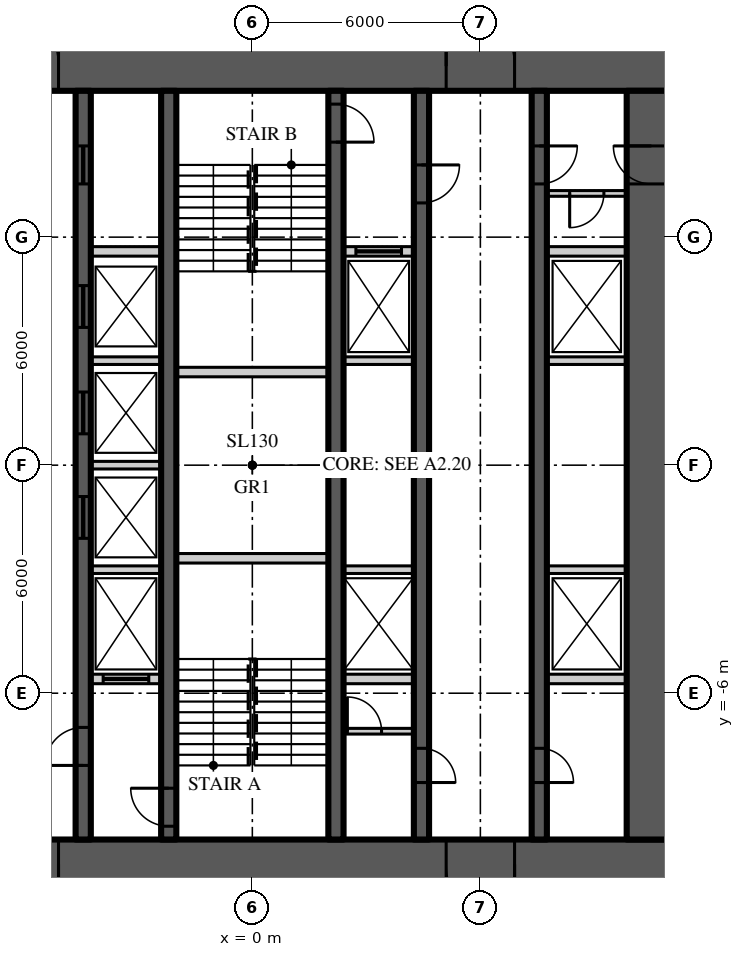
"""IFC4 building model, lengths in metres.
Left out: names, types, materials, properties, quantities, classifications, styles, units other than length and angle.
Written with IfcOpenShell. Run it as: python <this file> out.ifc"""

import sys

from ifc_helpers import new_model, si_unit, direction, frame, frame_2d, origin, place, context, subcontext, project, spatial, rectangle, extrude, element, fill, save


model = new_model("IFC4")
c1 = context("Model", 3, precision=1e-05, world=origin(), true_north=direction((0.0, 1.0)))
c2 = subcontext(c1, "Body", "Model", "MODEL_VIEW")
j1 = project(units=[si_unit("LENGTHUNIT", "METRE"), si_unit("PLANEANGLEUNIT", "RADIAN")], contexts=[c1])
p1 = place(None, origin())
s1 = spatial("IfcSite", under=j1, at=p1, CompositionType="ELEMENT")
p2 = place(p1, origin())
s2 = spatial("IfcBuilding", under=s1, at=p2, CompositionType="ELEMENT")
p3 = place(p2, frame((0.0, 0.0, 143.7)))
s3 = spatial("IfcBuildingStorey", under=s2, at=p3, CompositionType="ELEMENT", Elevation=143.7)
p4 = place(p3, frame((-11.15, 10.5, 0.0), z_axis=(0.0, 0.0, 1.0), x_axis=(1.0, 0.0, 0.0)))
e1 = element("IfcWall", 1, at=p4, inside=s3, PredefinedType="SHEAR", context=c2, shape_type="SweptSolid", body=[
    extrude(rectangle(XDim=22.3, YDim=1.3, at=frame_2d((11.15, 0.0))), origin(), (0.0, 0.0, 1.0), 3.9),
])
p5 = place(p4, frame((4.25, 0.0, 0.0)))
e2 = element("IfcOpeningElement", 2, at=p5, cuts=e1, PredefinedType="OPENING", context=c2, shape_type="SweptSolid", body=[
    extrude(rectangle(XDim=1.8, YDim=2.2, at=frame_2d((0.9, 1.1))), frame((0.0, 0.66, 0.0), z_axis=(0.0, -1.0, 0.0), x_axis=(1.0, 0.0, 0.0)), (0.0, 0.0, 1.0), 1.32),
])
p6 = place(p4, frame((16.25, 0.0, 0.0)))
e3 = element("IfcOpeningElement", 3, at=p6, cuts=e1, PredefinedType="OPENING", context=c2, shape_type="SweptSolid", body=[
    extrude(rectangle(XDim=1.8, YDim=2.2, at=frame_2d((0.9, 1.1))), frame((0.0, 0.66, 0.0), z_axis=(0.0, -1.0, 0.0), x_axis=(1.0, 0.0, 0.0)), (0.0, 0.0, 1.0), 1.32),
])
p7 = place(p3, frame((11.15, -10.5, 0.0), z_axis=(0.0, 0.0, 1.0), x_axis=(-1.0, 0.0, 0.0)))
e4 = element("IfcWall", 4, at=p7, inside=s3, PredefinedType="SHEAR", context=c2, shape_type="SweptSolid", body=[
    extrude(rectangle(XDim=22.3, YDim=1.3, at=frame_2d((11.15, 0.0))), origin(), (0.0, 0.0, 1.0), 3.9),
])
p8 = place(p7, frame((16.25, 0.0, 0.0)))
e5 = element("IfcOpeningElement", 5, at=p8, cuts=e4, PredefinedType="OPENING", context=c2, shape_type="SweptSolid", body=[
    extrude(rectangle(XDim=1.8, YDim=2.2, at=frame_2d((0.9, 1.1))), frame((0.0, 0.66, 0.0), z_axis=(0.0, -1.0, 0.0), x_axis=(1.0, 0.0, 0.0)), (0.0, 0.0, 1.0), 1.32),
])
p9 = place(p7, frame((4.25, 0.0, 0.0)))
e6 = element("IfcOpeningElement", 6, at=p9, cuts=e4, PredefinedType="OPENING", context=c2, shape_type="SweptSolid", body=[
    extrude(rectangle(XDim=1.8, YDim=2.2, at=frame_2d((0.9, 1.1))), frame((0.0, 0.66, 0.0), z_axis=(0.0, -1.0, 0.0), x_axis=(1.0, 0.0, 0.0)), (0.0, 0.0, 1.0), 1.32),
])
p10 = place(p3, frame((10.5, -9.85, 0.0), z_axis=(0.0, 0.0, 1.0), x_axis=(0.0, 1.0, 0.0)))
e7 = element("IfcWall", 7, at=p10, inside=s3, PredefinedType="SHEAR", context=c2, shape_type="SweptSolid", body=[
    extrude(rectangle(XDim=19.7, YDim=1.3, at=frame_2d((9.85, 0.0))), origin(), (0.0, 0.0, 1.0), 3.9),
])
p11 = place(p10, frame((17.25, 0.0, 0.0)))
e8 = element("IfcOpeningElement", 8, at=p11, cuts=e7, PredefinedType="OPENING", context=c2, shape_type="SweptSolid", body=[
    extrude(rectangle(XDim=1.0, YDim=2.2, at=frame_2d((0.5, 1.1))), frame((0.0, 0.66, 0.0), z_axis=(0.0, -1.0, 0.0), x_axis=(1.0, 0.0, 0.0)), (0.0, 0.0, 1.0), 1.32),
])
p12 = place(p3, frame((7.55, 9.85, 0.0), z_axis=(0.0, 0.0, 1.0), x_axis=(0.0, -1.0, 0.0)))
e9 = element("IfcWall", 9, at=p12, inside=s3, PredefinedType="SHEAR", context=c2, shape_type="SweptSolid", body=[
    extrude(rectangle(XDim=19.7, YDim=0.4, at=frame_2d((9.85, 0.0))), origin(), (0.0, 0.0, 1.0), 3.9),
])
p13 = place(p12, frame((1.45, 0.0, 0.0)))
e10 = element("IfcOpeningElement", 10, at=p13, cuts=e9, PredefinedType="OPENING", context=c2, shape_type="SweptSolid", body=[
    extrude(rectangle(XDim=1.0, YDim=2.2, at=frame_2d((0.5, 1.1))), frame((0.0, 0.21, 0.0), z_axis=(0.0, -1.0, 0.0), x_axis=(1.0, 0.0, 0.0)), (0.0, 0.0, 1.0), 0.42),
])
p14 = place(p12, frame((17.3, 0.0, 0.0)))
e11 = element("IfcOpeningElement", 11, at=p14, cuts=e9, PredefinedType="OPENING", context=c2, shape_type="SweptSolid", body=[
    extrude(rectangle(XDim=0.9, YDim=2.1, at=frame_2d((0.45, 1.05))), frame((0.0, 0.21, 0.0), z_axis=(0.0, -1.0, 0.0), x_axis=(1.0, 0.0, 0.0)), (0.0, 0.0, 1.0), 0.42),
])
p15 = place(p3, frame((-4.45, -9.85, 0.0), z_axis=(0.0, 0.0, 1.0), x_axis=(0.0, 1.0, 0.0)))
e12 = element("IfcWall", 12, at=p15, inside=s3, PredefinedType="SHEAR", context=c2, shape_type="SweptSolid", body=[
    extrude(rectangle(XDim=19.7, YDim=0.4, at=frame_2d((9.85, 0.0))), origin(), (0.0, 0.0, 1.0), 3.9),
])
p16 = place(p15, frame((1.95, 0.0, 0.0)))
e13 = element("IfcOpeningElement", 13, at=p16, cuts=e12, PredefinedType="OPENING", context=c2, shape_type="SweptSolid", body=[
    extrude(rectangle(XDim=1.0, YDim=2.2, at=frame_2d((0.5, 1.1))), frame((0.0, 0.21, 0.0), z_axis=(0.0, -1.0, 0.0), x_axis=(1.0, 0.0, 0.0)), (0.0, 0.0, 1.0), 0.42),
])
p17 = place(p15, frame((17.25, 0.0, 0.0)))
e14 = element("IfcOpeningElement", 14, at=p17, cuts=e12, PredefinedType="OPENING", context=c2, shape_type="SweptSolid", body=[
    extrude(rectangle(XDim=1.0, YDim=2.1, at=frame_2d((0.5, 1.05))), frame((0.0, 0.21, 0.0), z_axis=(0.0, -1.0, 0.0), x_axis=(1.0, 0.0, 0.0)), (0.0, 0.0, 1.0), 0.42),
])
p18 = place(p15, frame((7.925, 0.0, 0.0)))
e15 = element("IfcOpeningElement", 15, at=p18, cuts=e12, PredefinedType="OPENING", context=c2, shape_type="SweptSolid", body=[
    extrude(rectangle(XDim=1.1, YDim=2.2, at=frame_2d((0.55, 1.1))), frame((0.0, 0.21, 0.0), z_axis=(0.0, -1.0, 0.0), x_axis=(1.0, 0.0, 0.0)), (0.0, 0.0, 1.0), 0.42),
])
p19 = place(p15, frame((10.675, 0.0, 0.0)))
e16 = element("IfcOpeningElement", 16, at=p19, cuts=e12, PredefinedType="OPENING", context=c2, shape_type="SweptSolid", body=[
    extrude(rectangle(XDim=1.1, YDim=2.2, at=frame_2d((0.55, 1.1))), frame((0.0, 0.21, 0.0), z_axis=(0.0, -1.0, 0.0), x_axis=(1.0, 0.0, 0.0)), (0.0, 0.0, 1.0), 0.42),
])
p20 = place(p15, frame((13.475, 0.0, 0.0)))
e17 = element("IfcOpeningElement", 17, at=p20, cuts=e12, PredefinedType="OPENING", context=c2, shape_type="SweptSolid", body=[
    extrude(rectangle(XDim=1.1, YDim=2.2, at=frame_2d((0.55, 1.1))), frame((0.0, 0.21, 0.0), z_axis=(0.0, -1.0, 0.0), x_axis=(1.0, 0.0, 0.0)), (0.0, 0.0, 1.0), 0.42),
])
p21 = place(p3, frame((4.45, 9.85, 0.0), z_axis=(0.0, 0.0, 1.0), x_axis=(0.0, -1.0, 0.0)))
e18 = element("IfcWall", 18, at=p21, inside=s3, PredefinedType="SHEAR", context=c2, shape_type="SweptSolid", body=[
    extrude(rectangle(XDim=19.7, YDim=0.4, at=frame_2d((9.85, 0.0))), origin(), (0.0, 0.0, 1.0), 3.9),
])
p22 = place(p21, frame((1.95, 0.0, 0.0)))
e19 = element("IfcOpeningElement", 19, at=p22, cuts=e18, PredefinedType="OPENING", context=c2, shape_type="SweptSolid", body=[
    extrude(rectangle(XDim=1.0, YDim=2.2, at=frame_2d((0.5, 1.1))), frame((0.0, 0.21, 0.0), z_axis=(0.0, -1.0, 0.0), x_axis=(1.0, 0.0, 0.0)), (0.0, 0.0, 1.0), 0.42),
])
p23 = place(p21, frame((17.3, 0.0, 0.0)))
e20 = element("IfcOpeningElement", 20, at=p23, cuts=e18, PredefinedType="OPENING", context=c2, shape_type="SweptSolid", body=[
    extrude(rectangle(XDim=0.9, YDim=2.1, at=frame_2d((0.45, 1.05))), frame((0.0, 0.21, 0.0), z_axis=(0.0, -1.0, 0.0), x_axis=(1.0, 0.0, 0.0)), (0.0, 0.0, 1.0), 0.42),
])
p24 = place(p3, frame((-2.2, -9.85, 0.0), z_axis=(0.0, 0.0, 1.0), x_axis=(0.0, 1.0, 0.0)))
e21 = element("IfcWall", 21, at=p24, inside=s3, PredefinedType="SHEAR", context=c2, shape_type="SweptSolid", body=[
    extrude(rectangle(XDim=19.7, YDim=0.4, at=frame_2d((9.85, 0.0))), origin(), (0.0, 0.0, 1.0), 3.9),
])
p25 = place(p24, frame((0.35, 0.0, 0.0)))
e22 = element("IfcOpeningElement", 22, at=p25, cuts=e21, PredefinedType="OPENING", context=c2, shape_type="SweptSolid", body=[
    extrude(rectangle(XDim=1.0, YDim=2.2, at=frame_2d((0.5, 1.1))), frame((0.0, 0.21, 0.0), z_axis=(0.0, -1.0, 0.0), x_axis=(1.0, 0.0, 0.0)), (0.0, 0.0, 1.0), 0.42),
])
p26 = place(p3, frame((2.2, 9.85, 0.0), z_axis=(0.0, 0.0, 1.0), x_axis=(0.0, -1.0, 0.0)))
e23 = element("IfcWall", 23, at=p26, inside=s3, PredefinedType="SHEAR", context=c2, shape_type="SweptSolid", body=[
    extrude(rectangle(XDim=19.7, YDim=0.4, at=frame_2d((9.85, 0.0))), origin(), (0.0, 0.0, 1.0), 3.9),
])
p27 = place(p26, frame((0.35, 0.0, 0.0)))
e24 = element("IfcOpeningElement", 24, at=p27, cuts=e23, PredefinedType="OPENING", context=c2, shape_type="SweptSolid", body=[
    extrude(rectangle(XDim=1.0, YDim=2.2, at=frame_2d((0.5, 1.1))), frame((0.0, 0.21, 0.0), z_axis=(0.0, -1.0, 0.0), x_axis=(1.0, 0.0, 0.0)), (0.0, 0.0, 1.0), 0.42),
])
p28 = place(p3, frame((-4.25, 5.625, 0.0), z_axis=(0.0, 0.0, 1.0), x_axis=(1.0, 0.0, 0.0)))
e25 = element("IfcWall", 25, at=p28, inside=s3, PredefinedType="SOLIDWALL", context=c2, shape_type="SweptSolid", body=[
    extrude(rectangle(XDim=1.85, YDim=0.25, at=frame_2d((0.925, 0.0))), origin(), (0.0, 0.0, 1.0), 3.7),
])
p29 = place(p3, frame((2.4, 5.625, 0.0), z_axis=(0.0, 0.0, 1.0), x_axis=(1.0, 0.0, 0.0)))
e26 = element("IfcWall", 26, at=p29, inside=s3, PredefinedType="SOLIDWALL", context=c2, shape_type="SweptSolid", body=[
    extrude(rectangle(XDim=1.85, YDim=0.25, at=frame_2d((0.925, 0.0))), origin(), (0.0, 0.0, 1.0), 3.7),
])
p30 = place(p29, frame((0.325, 0.0, 0.0)))
e27 = element("IfcOpeningElement", 27, at=p30, cuts=e26, PredefinedType="OPENING", context=c2, shape_type="SweptSolid", body=[
    extrude(rectangle(XDim=1.2, YDim=2.2, at=frame_2d((0.6, 1.1))), frame((0.0, 0.135, 0.0), z_axis=(0.0, -1.0, 0.0), x_axis=(1.0, 0.0, 0.0)), (0.0, 0.0, 1.0), 0.27),
])
p31 = place(p3, frame((7.75, 5.625, 0.0), z_axis=(0.0, 0.0, 1.0), x_axis=(1.0, 0.0, 0.0)))
e28 = element("IfcWall", 28, at=p31, inside=s3, PredefinedType="SOLIDWALL", context=c2, shape_type="SweptSolid", body=[
    extrude(rectangle(XDim=2.1, YDim=0.25, at=frame_2d((1.05, 0.0))), origin(), (0.0, 0.0, 1.0), 3.7),
])
p32 = place(p3, frame((-4.25, -5.625, 0.0), z_axis=(0.0, 0.0, 1.0), x_axis=(1.0, 0.0, 0.0)))
e29 = element("IfcWall", 29, at=p32, inside=s3, PredefinedType="SOLIDWALL", context=c2, shape_type="SweptSolid", body=[
    extrude(rectangle(XDim=1.85, YDim=0.25, at=frame_2d((0.925, 0.0))), origin(), (0.0, 0.0, 1.0), 3.7),
])
p33 = place(p32, frame((0.325, 0.0, 0.0)))
e30 = element("IfcOpeningElement", 30, at=p33, cuts=e29, PredefinedType="OPENING", context=c2, shape_type="SweptSolid", body=[
    extrude(rectangle(XDim=1.2, YDim=2.2, at=frame_2d((0.6, 1.1))), frame((0.0, 0.135, 0.0), z_axis=(0.0, -1.0, 0.0), x_axis=(1.0, 0.0, 0.0)), (0.0, 0.0, 1.0), 0.27),
])
p34 = place(p3, frame((2.4, -5.625, 0.0), z_axis=(0.0, 0.0, 1.0), x_axis=(1.0, 0.0, 0.0)))
e31 = element("IfcWall", 31, at=p34, inside=s3, PredefinedType="SOLIDWALL", context=c2, shape_type="SweptSolid", body=[
    extrude(rectangle(XDim=1.85, YDim=0.25, at=frame_2d((0.925, 0.0))), origin(), (0.0, 0.0, 1.0), 3.7),
])
p35 = place(p3, frame((7.75, -5.625, 0.0), z_axis=(0.0, 0.0, 1.0), x_axis=(1.0, 0.0, 0.0)))
e32 = element("IfcWall", 32, at=p35, inside=s3, PredefinedType="SOLIDWALL", context=c2, shape_type="SweptSolid", body=[
    extrude(rectangle(XDim=2.1, YDim=0.25, at=frame_2d((1.05, 0.0))), origin(), (0.0, 0.0, 1.0), 3.7),
])
for number, where, z_axis, x_axis in (
    (33, (-2.0, -2.45, 0.0), (0.0, 0.0, 1.0), (1.0, 0.0, 0.0)),
    (34, (-2.0, 2.45, 0.0), (0.0, 0.0, 1.0), (1.0, 0.0, 0.0)),
):
    element("IfcWall", number, at=place(p3, frame(where, z_axis=z_axis, x_axis=x_axis)), inside=s3, PredefinedType="SOLIDWALL", context=c2, shape_type="SweptSolid", body=[
        extrude(rectangle(XDim=4.0, YDim=0.25, at=frame_2d((2.0, 0.0))), origin(), (0.0, 0.0, 1.0), 3.7),
    ])
for number, where, z_axis, x_axis in (
    (35, (-4.25, -2.75, 0.0), (0.0, 0.0, 1.0), (1.0, 0.0, 0.0)),
    (36, (2.4, -2.75, 0.0), (0.0, 0.0, 1.0), (1.0, 0.0, 0.0)),
):
    element("IfcWall", number, at=place(p3, frame(where, z_axis=z_axis, x_axis=x_axis)), inside=s3, PredefinedType="SOLIDWALL", context=c2, shape_type="SweptSolid", body=[
        extrude(rectangle(XDim=1.85, YDim=0.2, at=frame_2d((0.925, 0.0))), origin(), (0.0, 0.0, 1.0), 3.7),
    ])
p36 = place(p3, frame((7.75, -2.75, 0.0), z_axis=(0.0, 0.0, 1.0), x_axis=(1.0, 0.0, 0.0)))
e37 = element("IfcWall", 37, at=p36, inside=s3, PredefinedType="SOLIDWALL", context=c2, shape_type="SweptSolid", body=[
    extrude(rectangle(XDim=2.1, YDim=0.2, at=frame_2d((1.05, 0.0))), origin(), (0.0, 0.0, 1.0), 3.7),
])
for number, where, z_axis, x_axis in (
    (38, (-4.25, 0.0, 0.0), (0.0, 0.0, 1.0), (1.0, 0.0, 0.0)),
    (39, (-4.25, 2.75, 0.0), (0.0, 0.0, 1.0), (1.0, 0.0, 0.0)),
    (40, (2.4, 2.75, 0.0), (0.0, 0.0, 1.0), (1.0, 0.0, 0.0)),
):
    element("IfcWall", number, at=place(p3, frame(where, z_axis=z_axis, x_axis=x_axis)), inside=s3, PredefinedType="SOLIDWALL", context=c2, shape_type="SweptSolid", body=[
        extrude(rectangle(XDim=1.85, YDim=0.2, at=frame_2d((0.925, 0.0))), origin(), (0.0, 0.0, 1.0), 3.7),
    ])
p37 = place(p3, frame((7.75, 2.75, 0.0), z_axis=(0.0, 0.0, 1.0), x_axis=(1.0, 0.0, 0.0)))
e41 = element("IfcWall", 41, at=p37, inside=s3, PredefinedType="SOLIDWALL", context=c2, shape_type="SweptSolid", body=[
    extrude(rectangle(XDim=2.1, YDim=0.2, at=frame_2d((1.05, 0.0))), origin(), (0.0, 0.0, 1.0), 3.7),
])
p38 = place(p3, frame((2.4, -7.0, 0.0), z_axis=(0.0, 0.0, 1.0), x_axis=(1.0, 0.0, 0.0)))
e42 = element("IfcWall", 42, at=p38, inside=s3, PredefinedType="SOLIDWALL", context=c2, shape_type="SweptSolid", body=[
    extrude(rectangle(XDim=1.85, YDim=0.15, at=frame_2d((0.925, 0.0))), origin(), (0.0, 0.0, 1.0), 3.77),
])
p39 = place(p38, frame((0.1, 0.0, 0.0)))
e43 = element("IfcOpeningElement", 43, at=p39, cuts=e42, PredefinedType="OPENING", context=c2, shape_type="SweptSolid", body=[
    extrude(rectangle(XDim=0.9, YDim=2.1, at=frame_2d((0.45, 1.05))), frame((0.0, 0.085, 0.0), z_axis=(0.0, -1.0, 0.0), x_axis=(1.0, 0.0, 0.0)), (0.0, 0.0, 1.0), 0.17),
])
p40 = place(p3, frame((9.85, 7.15, 0.0), z_axis=(0.0, 0.0, 1.0), x_axis=(-1.0, 0.0, 0.0)))
e44 = element("IfcWall", 44, at=p40, inside=s3, PredefinedType="SOLIDWALL", context=c2, shape_type="SweptSolid", body=[
    extrude(rectangle(XDim=2.1, YDim=0.15, at=frame_2d((1.05, 0.0))), origin(), (0.0, 0.0, 1.0), 3.77),
])
p41 = place(p40, frame((0.6, 0.0, 0.0)))
e45 = element("IfcOpeningElement", 45, at=p41, cuts=e44, PredefinedType="OPENING", context=c2, shape_type="SweptSolid", body=[
    extrude(rectangle(XDim=0.9, YDim=2.1, at=frame_2d((0.45, 1.05))), frame((0.0, 0.085, 0.0), z_axis=(0.0, -1.0, 0.0), x_axis=(1.0, 0.0, 0.0)), (0.0, 0.0, 1.0), 0.17),
])
p42 = place(p5, origin())
e46 = element("IfcDoor", 46, at=p42, inside=s3, OperationType="DOUBLE_DOOR_DOUBLE_SWING", PredefinedType="DOOR", context=c2, shape_type="SweptSolid", body=[
    extrude(rectangle(XDim=1.8, YDim=2.2, at=frame_2d((0.9, 1.1))), frame((0.0, 0.025, 0.0), z_axis=(0.0, -1.0, 0.0), x_axis=(1.0, 0.0, 0.0)), (0.0, 0.0, 1.0), 0.05),
])
fill(e2, e46)
p43 = place(p8, origin())
e47 = element("IfcDoor", 47, at=p43, inside=s3, OperationType="DOUBLE_DOOR_DOUBLE_SWING", PredefinedType="DOOR", context=c2, shape_type="SweptSolid", body=[
    extrude(rectangle(XDim=1.8, YDim=2.2, at=frame_2d((0.9, 1.1))), frame((0.0, 0.025, 0.0), z_axis=(0.0, -1.0, 0.0), x_axis=(1.0, 0.0, 0.0)), (0.0, 0.0, 1.0), 0.05),
])
fill(e5, e47)
p44 = place(p6, origin())
e48 = element("IfcDoor", 48, at=p44, inside=s3, OperationType="DOUBLE_DOOR_DOUBLE_SWING", PredefinedType="DOOR", context=c2, shape_type="SweptSolid", body=[
    extrude(rectangle(XDim=1.8, YDim=2.2, at=frame_2d((0.9, 1.1))), frame((0.0, 0.025, 0.0), z_axis=(0.0, -1.0, 0.0), x_axis=(1.0, 0.0, 0.0)), (0.0, 0.0, 1.0), 0.05),
])
fill(e3, e48)
p45 = place(p9, origin())
e49 = element("IfcDoor", 49, at=p45, inside=s3, OperationType="DOUBLE_DOOR_DOUBLE_SWING", PredefinedType="DOOR", context=c2, shape_type="SweptSolid", body=[
    extrude(rectangle(XDim=1.8, YDim=2.2, at=frame_2d((0.9, 1.1))), frame((0.0, 0.025, 0.0), z_axis=(0.0, -1.0, 0.0), x_axis=(1.0, 0.0, 0.0)), (0.0, 0.0, 1.0), 0.05),
])
fill(e6, e49)
p46 = place(p13, origin())
e50 = element("IfcDoor", 50, at=p46, inside=s3, OperationType="SINGLE_SWING_LEFT", PredefinedType="DOOR", context=c2, shape_type="SweptSolid", body=[
    extrude(rectangle(XDim=1.0, YDim=2.2, at=frame_2d((0.5, 1.1))), frame((0.0, 0.025, 0.0), z_axis=(0.0, -1.0, 0.0), x_axis=(1.0, 0.0, 0.0)), (0.0, 0.0, 1.0), 0.05),
])
fill(e10, e50)
p47 = place(p11, origin())
e51 = element("IfcDoor", 51, at=p47, inside=s3, OperationType="SINGLE_SWING_RIGHT", PredefinedType="DOOR", context=c2, shape_type="SweptSolid", body=[
    extrude(rectangle(XDim=1.0, YDim=2.2, at=frame_2d((0.5, 1.1))), frame((0.0, 0.025, 0.0), z_axis=(0.0, -1.0, 0.0), x_axis=(1.0, 0.0, 0.0)), (0.0, 0.0, 1.0), 0.05),
])
fill(e8, e51)
p48 = place(p16, origin())
e52 = element("IfcDoor", 52, at=p48, inside=s3, OperationType="SINGLE_SWING_LEFT", PredefinedType="DOOR", context=c2, shape_type="SweptSolid", body=[
    extrude(rectangle(XDim=1.0, YDim=2.2, at=frame_2d((0.5, 1.1))), frame((0.0, 0.025, 0.0), z_axis=(0.0, -1.0, 0.0), x_axis=(1.0, 0.0, 0.0)), (0.0, 0.0, 1.0), 0.05),
])
fill(e13, e52)
p49 = place(p25, origin())
e53 = element("IfcDoor", 53, at=p49, inside=s3, OperationType="SINGLE_SWING_RIGHT", PredefinedType="DOOR", context=c2, shape_type="SweptSolid", body=[
    extrude(rectangle(XDim=1.0, YDim=2.2, at=frame_2d((0.5, 1.1))), frame((0.0, 0.025, 0.0), z_axis=(0.0, -1.0, 0.0), x_axis=(1.0, 0.0, 0.0)), (0.0, 0.0, 1.0), 0.05),
])
fill(e22, e53)
p50 = place(p22, origin())
e54 = element("IfcDoor", 54, at=p50, inside=s3, OperationType="SINGLE_SWING_LEFT", PredefinedType="DOOR", context=c2, shape_type="SweptSolid", body=[
    extrude(rectangle(XDim=1.0, YDim=2.2, at=frame_2d((0.5, 1.1))), frame((0.0, 0.025, 0.0), z_axis=(0.0, -1.0, 0.0), x_axis=(1.0, 0.0, 0.0)), (0.0, 0.0, 1.0), 0.05),
])
fill(e19, e54)
p51 = place(p27, origin())
e55 = element("IfcDoor", 55, at=p51, inside=s3, OperationType="SINGLE_SWING_RIGHT", PredefinedType="DOOR", context=c2, shape_type="SweptSolid", body=[
    extrude(rectangle(XDim=1.0, YDim=2.2, at=frame_2d((0.5, 1.1))), frame((0.0, 0.025, 0.0), z_axis=(0.0, -1.0, 0.0), x_axis=(1.0, 0.0, 0.0)), (0.0, 0.0, 1.0), 0.05),
])
fill(e24, e55)
p52 = place(p17, origin())
e56 = element("IfcDoor", 56, at=p52, inside=s3, OperationType="SLIDING_TO_LEFT", PredefinedType="DOOR", context=c2, shape_type="SweptSolid", body=[
    extrude(rectangle(XDim=1.0, YDim=2.1, at=frame_2d((0.5, 1.05))), frame((0.0, 0.025, 0.0), z_axis=(0.0, -1.0, 0.0), x_axis=(1.0, 0.0, 0.0)), (0.0, 0.0, 1.0), 0.05),
])
fill(e14, e56)
p53 = place(p14, origin())
e57 = element("IfcDoor", 57, at=p53, inside=s3, OperationType="SINGLE_SWING_RIGHT", PredefinedType="DOOR", context=c2, shape_type="SweptSolid", body=[
    extrude(rectangle(XDim=0.9, YDim=2.1, at=frame_2d((0.45, 1.05))), frame((0.0, 0.025, 0.0), z_axis=(0.0, -1.0, 0.0), x_axis=(1.0, 0.0, 0.0)), (0.0, 0.0, 1.0), 0.05),
])
fill(e11, e57)
p54 = place(p23, origin())
e58 = element("IfcDoor", 58, at=p54, inside=s3, OperationType="SINGLE_SWING_RIGHT", PredefinedType="DOOR", context=c2, shape_type="SweptSolid", body=[
    extrude(rectangle(XDim=0.9, YDim=2.1, at=frame_2d((0.45, 1.05))), frame((0.0, 0.025, 0.0), z_axis=(0.0, -1.0, 0.0), x_axis=(1.0, 0.0, 0.0)), (0.0, 0.0, 1.0), 0.05),
])
fill(e20, e58)
p55 = place(p18, origin())
e59 = element("IfcDoor", 59, at=p55, inside=s3, OperationType="SLIDING_TO_LEFT", PredefinedType="DOOR", context=c2, shape_type="SweptSolid", body=[
    extrude(rectangle(XDim=1.1, YDim=2.2, at=frame_2d((0.55, 1.1))), frame((0.0, 0.025, 0.0), z_axis=(0.0, -1.0, 0.0), x_axis=(1.0, 0.0, 0.0)), (0.0, 0.0, 1.0), 0.05),
])
fill(e15, e59)
p56 = place(p19, origin())
e60 = element("IfcDoor", 60, at=p56, inside=s3, OperationType="SLIDING_TO_LEFT", PredefinedType="DOOR", context=c2, shape_type="SweptSolid", body=[
    extrude(rectangle(XDim=1.1, YDim=2.2, at=frame_2d((0.55, 1.1))), frame((0.0, 0.025, 0.0), z_axis=(0.0, -1.0, 0.0), x_axis=(1.0, 0.0, 0.0)), (0.0, 0.0, 1.0), 0.05),
])
fill(e16, e60)
p57 = place(p20, origin())
e61 = element("IfcDoor", 61, at=p57, inside=s3, OperationType="SLIDING_TO_LEFT", PredefinedType="DOOR", context=c2, shape_type="SweptSolid", body=[
    extrude(rectangle(XDim=1.1, YDim=2.2, at=frame_2d((0.55, 1.1))), frame((0.0, 0.025, 0.0), z_axis=(0.0, -1.0, 0.0), x_axis=(1.0, 0.0, 0.0)), (0.0, 0.0, 1.0), 0.05),
])
fill(e17, e61)
p58 = place(p33, origin())
e62 = element("IfcDoor", 62, at=p58, inside=s3, OperationType="SLIDING_TO_LEFT", PredefinedType="DOOR", context=c2, shape_type="SweptSolid", body=[
    extrude(rectangle(XDim=1.2, YDim=2.2, at=frame_2d((0.6, 1.1))), frame((0.0, 0.025, 0.0), z_axis=(0.0, -1.0, 0.0), x_axis=(1.0, 0.0, 0.0)), (0.0, 0.0, 1.0), 0.05),
])
fill(e30, e62)
p59 = place(p30, origin())
e63 = element("IfcDoor", 63, at=p59, inside=s3, OperationType="SLIDING_TO_LEFT", PredefinedType="DOOR", context=c2, shape_type="SweptSolid", body=[
    extrude(rectangle(XDim=1.2, YDim=2.2, at=frame_2d((0.6, 1.1))), frame((0.0, 0.025, 0.0), z_axis=(0.0, -1.0, 0.0), x_axis=(1.0, 0.0, 0.0)), (0.0, 0.0, 1.0), 0.05),
])
fill(e27, e63)
p60 = place(p39, origin())
e64 = element("IfcDoor", 64, at=p60, inside=s3, OperationType="SINGLE_SWING_LEFT", PredefinedType="DOOR", context=c2, shape_type="SweptSolid", body=[
    extrude(rectangle(XDim=0.9, YDim=2.1, at=frame_2d((0.45, 1.05))), frame((0.0, 0.025, 0.0), z_axis=(0.0, -1.0, 0.0), x_axis=(1.0, 0.0, 0.0)), (0.0, 0.0, 1.0), 0.05),
])
fill(e43, e64)
p61 = place(p41, origin())
e65 = element("IfcDoor", 65, at=p61, inside=s3, OperationType="SINGLE_SWING_RIGHT", PredefinedType="DOOR", context=c2, shape_type="SweptSolid", body=[
    extrude(rectangle(XDim=0.9, YDim=2.1, at=frame_2d((0.45, 1.05))), frame((0.0, 0.025, 0.0), z_axis=(0.0, -1.0, 0.0), x_axis=(1.0, 0.0, 0.0)), (0.0, 0.0, 1.0), 0.05),
])
fill(e45, e65)
save(model, sys.argv[1])
